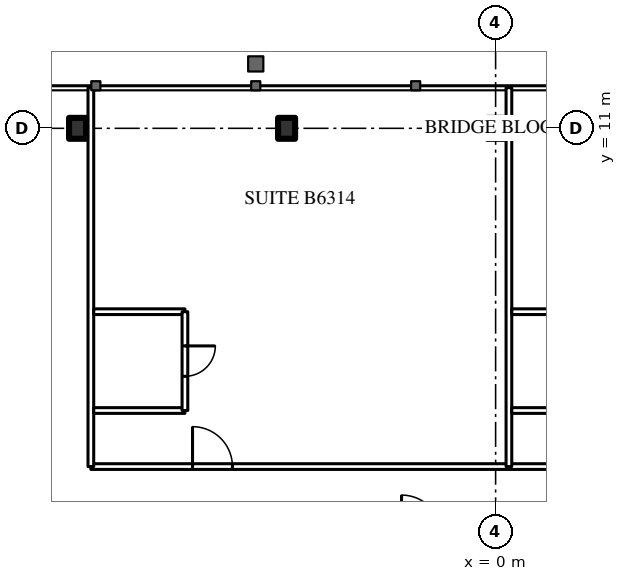
"""IFC4 building model, lengths in metres.
Left out: names, types, materials, properties, quantities, classifications, styles, units other than length and angle.
Written with IfcOpenShell. Run it as: python <this file> out.ifc"""

import sys

from ifc_helpers import new_model, si_unit, direction, frame, frame_2d, origin, origin_2d, place, context, subcontext, project, spatial, rectangle, i_section, extrude, element, fill, save


model = new_model("IFC4")
c1 = context("Model", 3, precision=1e-05, world=origin(), true_north=direction((0.0, 1.0)))
c2 = subcontext(c1, "Body", "Model", "MODEL_VIEW")
j1 = project(units=[si_unit("LENGTHUNIT", "METRE"), si_unit("PLANEANGLEUNIT", "RADIAN")], contexts=[c1])
p1 = place(None, origin())
s1 = spatial("IfcSite", under=j1, at=p1, CompositionType="ELEMENT")
p2 = place(p1, origin())
s2 = spatial("IfcBuilding", under=s1, at=p2, CompositionType="ELEMENT")
p3 = place(p2, frame((0.0, 0.0, 236.9)))
s3 = spatial("IfcBuildingStorey", under=s2, at=p3, CompositionType="ELEMENT", Elevation=236.9)
for number, where, z_axis, x_axis in (
    (1, (-11.0, 11.0, 0.0), (0.0, 0.0, 1.0), (1.0, 0.0, 0.0)),
    (2, (-5.5, 11.0, 0.0), (0.0, 0.0, 1.0), (1.0, 0.0, 0.0)),
    (3, (0.0, 11.0, 0.0), (0.0, 0.0, 1.0), (1.0, 0.0, 0.0)),
):
    element("IfcColumn", number, at=place(p3, frame(where, z_axis=z_axis, x_axis=x_axis)), inside=s3, PredefinedType="COLUMN", context=c2, shape_type="SweptSolid", body=[
        extrude(i_section(OverallWidth=0.448, OverallDepth=0.55, WebThickness=0.072, FlangeThickness=0.115, FilletRadius=0.02, at=origin_2d()), origin(), (0.0, 0.0, 1.0), 3.6),
    ])
p4 = place(p3, frame((-10.65, 2.1, 0.0), z_axis=(0.0, 0.0, 1.0), x_axis=(1.0, 0.0, 0.0)))
e4 = element("IfcWall", 4, at=p4, inside=s3, PredefinedType="PARTITIONING", context=c2, shape_type="SweptSolid", body=[
    extrude(rectangle(XDim=38.15, YDim=0.15, at=frame_2d((19.075, 0.0))), origin(), (0.0, 0.0, 1.0), 3.4),
])
p5 = place(p4, frame((2.675, 0.0, 0.0)))
e5 = element("IfcOpeningElement", 5, at=p5, cuts=e4, PredefinedType="OPENING", context=c2, shape_type="SweptSolid", body=[
    extrude(rectangle(XDim=1.05, YDim=2.4, at=frame_2d((0.525, 1.2))), frame((0.0, 0.085, 0.0), z_axis=(0.0, -1.0, 0.0), x_axis=(1.0, 0.0, 0.0)), (0.0, 0.0, 1.0), 0.17),
])
p6 = place(p4, frame((13.675, 0.0, 0.0)))
e6 = element("IfcOpeningElement", 6, at=p6, cuts=e4, PredefinedType="OPENING", context=c2, shape_type="SweptSolid", body=[
    extrude(rectangle(XDim=1.05, YDim=2.4, at=frame_2d((0.525, 1.2))), frame((0.0, 0.085, 0.0), z_axis=(0.0, -1.0, 0.0), x_axis=(1.0, 0.0, 0.0)), (0.0, 0.0, 1.0), 0.17),
])
p7 = place(p4, frame((24.675, 0.0, 0.0)))
e7 = element("IfcOpeningElement", 7, at=p7, cuts=e4, PredefinedType="OPENING", context=c2, shape_type="SweptSolid", body=[
    extrude(rectangle(XDim=1.05, YDim=2.4, at=frame_2d((0.525, 1.2))), frame((0.0, 0.085, 0.0), z_axis=(0.0, -1.0, 0.0), x_axis=(1.0, 0.0, 0.0)), (0.0, 0.0, 1.0), 0.17),
])
p8 = place(p4, frame((30.175, 0.0, 0.0)))
e8 = element("IfcOpeningElement", 8, at=p8, cuts=e4, PredefinedType="OPENING", context=c2, shape_type="SweptSolid", body=[
    extrude(rectangle(XDim=1.05, YDim=2.4, at=frame_2d((0.525, 1.2))), frame((0.0, 0.085, 0.0), z_axis=(0.0, -1.0, 0.0), x_axis=(1.0, 0.0, 0.0)), (0.0, 0.0, 1.0), 0.17),
])
p9 = place(p4, frame((35.675, 0.0, 0.0)))
e9 = element("IfcOpeningElement", 9, at=p9, cuts=e4, PredefinedType="OPENING", context=c2, shape_type="SweptSolid", body=[
    extrude(rectangle(XDim=1.05, YDim=2.4, at=frame_2d((0.525, 1.2))), frame((0.0, 0.085, 0.0), z_axis=(0.0, -1.0, 0.0), x_axis=(1.0, 0.0, 0.0)), (0.0, 0.0, 1.0), 0.17),
])
for number, where, z_axis, x_axis in (
    (10, (-10.65, 2.1, 0.0), (0.0, 0.0, 1.0), (0.0, 1.0, 0.0)),
    (11, (0.35, 2.1, 0.0), (0.0, 0.0, 1.0), (0.0, 1.0, 0.0)),
):
    element("IfcWall", number, at=place(p3, frame(where, z_axis=z_axis, x_axis=x_axis)), inside=s3, PredefinedType="PARTITIONING", context=c2, shape_type="SweptSolid", body=[
        extrude(rectangle(XDim=9.97, YDim=0.15, at=frame_2d((4.985, 0.0))), origin(), (0.0, 0.0, 1.0), 3.4),
    ])
for number, where, z_axis, x_axis in (
    (12, (-10.575, 6.175, 0.0), (0.0, 0.0, 1.0), (1.0, 0.0, 0.0)),
    (13, (-10.575, 3.575, 0.0), (0.0, 0.0, 1.0), (1.0, 0.0, 0.0)),
):
    element("IfcWall", number, at=place(p3, frame(where, z_axis=z_axis, x_axis=x_axis)), inside=s3, PredefinedType="PARTITIONING", context=c2, shape_type="SweptSolid", body=[
        extrude(rectangle(XDim=2.4, YDim=0.15, at=frame_2d((1.2, 0.0))), origin(), (0.0, 0.0, 1.0), 3.4),
    ])
p10 = place(p3, frame((-8.175, 3.575, 0.0), z_axis=(0.0, 0.0, 1.0), x_axis=(0.0, 1.0, 0.0)))
e14 = element("IfcWall", 14, at=p10, inside=s3, PredefinedType="PARTITIONING", context=c2, shape_type="SweptSolid", body=[
    extrude(rectangle(XDim=2.6, YDim=0.15, at=frame_2d((1.3, 0.0))), origin(), (0.0, 0.0, 1.0), 3.4),
])
p11 = place(p10, frame((0.9, 0.0, 0.0)))
e15 = element("IfcOpeningElement", 15, at=p11, cuts=e14, PredefinedType="OPENING", context=c2, shape_type="SweptSolid", body=[
    extrude(rectangle(XDim=0.8, YDim=2.2, at=frame_2d((0.4, 1.1))), frame((0.0, 0.085, 0.0), z_axis=(0.0, -1.0, 0.0), x_axis=(1.0, 0.0, 0.0)), (0.0, 0.0, 1.0), 0.17),
])
for number, where, z_axis, x_axis in (
    (16, (0.425, 6.175, 0.0), (0.0, 0.0, 1.0), (1.0, 0.0, 0.0)),
    (17, (0.425, 3.575, 0.0), (0.0, 0.0, 1.0), (1.0, 0.0, 0.0)),
):
    element("IfcWall", number, at=place(p3, frame(where, z_axis=z_axis, x_axis=x_axis)), inside=s3, PredefinedType="PARTITIONING", context=c2, shape_type="SweptSolid", body=[
        extrude(rectangle(XDim=2.4, YDim=0.15, at=frame_2d((1.2, 0.0))), origin(), (0.0, 0.0, 1.0), 3.4),
    ])
p12 = place(p11, origin())
e18 = element("IfcDoor", 18, at=p12, inside=s3, OperationType="SINGLE_SWING_RIGHT", PredefinedType="DOOR", context=c2, shape_type="SweptSolid", body=[
    extrude(rectangle(XDim=0.8, YDim=2.2, at=frame_2d((0.4, 1.1))), frame((0.0, 0.025, 0.0), z_axis=(0.0, -1.0, 0.0), x_axis=(1.0, 0.0, 0.0)), (0.0, 0.0, 1.0), 0.05),
])
fill(e15, e18)
p13 = place(p5, origin())
e19 = element("IfcDoor", 19, at=p13, inside=s3, OperationType="SINGLE_SWING_LEFT", PredefinedType="DOOR", context=c2, shape_type="SweptSolid", body=[
    extrude(rectangle(XDim=1.05, YDim=2.4, at=frame_2d((0.525, 1.2))), frame((0.0, 0.025, 0.0), z_axis=(0.0, -1.0, 0.0), x_axis=(1.0, 0.0, 0.0)), (0.0, 0.0, 1.0), 0.05),
])
fill(e5, e19)
save(model, sys.argv[1])
